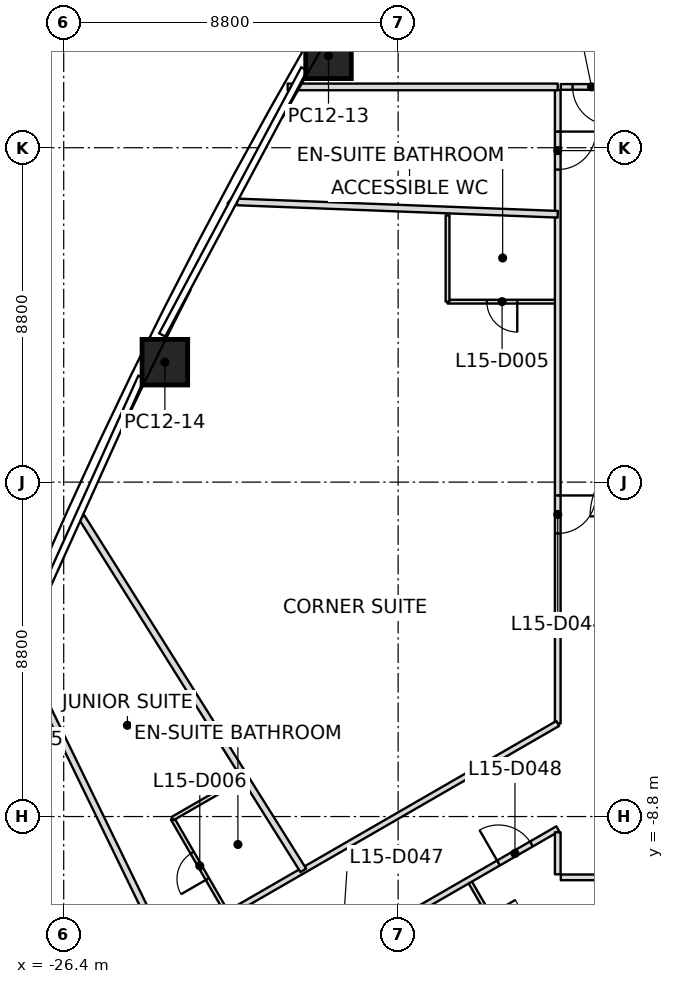
"""IFC4 building model, lengths in metres.
Left out: names, types, materials, properties, quantities, classifications, styles, units other than length and angle.
Written with IfcOpenShell. Run it as: python <this file> out.ifc"""

import sys

from ifc_helpers import new_model, si_unit, direction, frame, frame_2d, origin, origin_2d, place, context, subcontext, project, spatial, rectangle, extrude, element, fill, save


model = new_model("IFC4")
c1 = context("Model", 3, precision=1e-05, world=origin(), true_north=direction((0.0, 1.0)))
c2 = subcontext(c1, "Body", "Model", "MODEL_VIEW")
j1 = project(units=[si_unit("LENGTHUNIT", "METRE"), si_unit("PLANEANGLEUNIT", "RADIAN")], contexts=[c1])
p1 = place(None, origin())
s1 = spatial("IfcSite", under=j1, at=p1, CompositionType="ELEMENT")
p2 = place(p1, origin())
s2 = spatial("IfcBuilding", under=s1, at=p2, CompositionType="ELEMENT")
p3 = place(p2, frame((0.0, 0.0, 77.6)))
s3 = spatial("IfcBuildingStorey", under=s2, at=p3, CompositionType="ELEMENT", Elevation=77.6)
p4 = place(p3, frame((-19.432, 11.219, 0.0), z_axis=(0.010688725148, -0.006202099777, 0.999923639641), x_axis=(0.499971436973, 0.8660418936, 2.7223042e-05)))
e1 = element("IfcColumn", 1, at=p4, inside=s3, PredefinedType="COLUMN", context=c2, shape_type="SweptSolid", body=[
    extrude(rectangle(XDim=1.2, YDim=1.2, at=origin_2d()), origin(), (0.0, 0.0, 1.0), 3.7),
])
p5 = place(p3, frame((-23.738, 3.156, 0.0), z_axis=(0.015240683228, 0.002309194428, 0.99988118754), x_axis=(0.441517205772, 0.897209609592, -0.00880190108)))
e2 = element("IfcColumn", 2, at=p5, inside=s3, PredefinedType="COLUMN", context=c2, shape_type="SweptSolid", body=[
    extrude(rectangle(XDim=1.2, YDim=1.2, at=origin_2d()), origin(), (0.0, 0.0, 1.0), 3.7),
])
p6 = place(p3, frame((-27.5, -5.174, 0.0), z_axis=(0.019460655113, 0.011016709844, 0.999749926235), x_axis=(0.381127273401, 0.924354950562, -0.017604739188)))
e3 = element("IfcColumn", 3, at=p6, inside=s3, PredefinedType="COLUMN", context=c2, shape_type="SweptSolid", body=[
    extrude(rectangle(XDim=1.2, YDim=1.2, at=origin_2d()), origin(), (0.0, 0.0, 1.0), 3.701),
])
p7 = place(p3, frame((-23.732, -12.316, 0.0), z_axis=(0.0, 0.0, 1.0), x_axis=(-0.437347411192, 0.899292634198, 0.0)))
e4 = element("IfcWall", 4, at=p7, inside=s3, PredefinedType="PARTITIONING", context=c2, shape_type="SweptSolid", body=[
    extrude(rectangle(XDim=8.705, YDim=0.175, at=frame_2d((4.352, 0.0))), origin(), (0.0, 0.0, 1.0), 3.15),
])
p8 = place(p3, frame((-20.095, -10.216, 0.0), z_axis=(0.0, 0.0, 1.0), x_axis=(-0.531613758333, 0.846986901877, 0.0)))
e5 = element("IfcWall", 5, at=p8, inside=s3, PredefinedType="PARTITIONING", context=c2, shape_type="SweptSolid", body=[
    extrude(rectangle(XDim=10.974, YDim=0.175, at=frame_2d((5.487, 0.0))), origin(), (0.0, 0.0, 1.0), 2.934),
])
p9 = place(p3, frame((-21.889, 7.287, 0.0), z_axis=(0.0, 0.0, 1.0), x_axis=(-0.779588898124, 0.626291585383, 0.0)))
e6 = element("IfcWall", 6, at=p9, inside=s3, PredefinedType="PARTITIONING", context=c2, shape_type="SweptSolid", body=[
    extrude(rectangle(XDim=0.186, YDim=0.175, at=frame_2d((0.093, 0.0))), origin(), (0.0, 0.0, 1.0), 3.15),
])
p10 = place(p3, frame((-21.839, 7.374, 0.0), z_axis=(0.0, 0.0, 1.0), x_axis=(0.999261729628, -0.038418689463, 0.0)))
e7 = element("IfcWall", 7, at=p10, inside=s3, PredefinedType="PARTITIONING", context=c2, shape_type="SweptSolid", body=[
    extrude(rectangle(XDim=8.446, YDim=0.175, at=frame_2d((4.223, 0.0))), origin(), (0.0, 0.0, 1.0), 2.934),
])
p11 = place(p3, frame((-13.4, 10.4, 0.0), z_axis=(0.0, 0.0, 1.0), x_axis=(-1.0, 0.0, 0.0)))
e8 = element("IfcWall", 8, at=p11, inside=s3, PredefinedType="PARTITIONING", context=c2, shape_type="SweptSolid", body=[
    extrude(rectangle(XDim=7.107, YDim=0.175, at=frame_2d((3.554, 0.0))), origin(), (0.0, 0.0, 1.0), 2.934),
])
p12 = place(p3, frame((-13.4, 10.32, 0.0), z_axis=(0.0, 0.0, 1.0), x_axis=(0.0, -1.0, 0.0)))
e9 = element("IfcWall", 9, at=p12, inside=s3, PredefinedType="PARTITIONING", context=c2, shape_type="SweptSolid", body=[
    extrude(rectangle(XDim=16.671, YDim=0.15, at=frame_2d((8.335, 0.0))), origin(), (0.0, 0.0, 1.0), 2.947),
])
p13 = place(p12, frame((1.095, 0.0, 0.0)))
e10 = element("IfcOpeningElement", 10, at=p13, cuts=e9, PredefinedType="OPENING", context=c2, shape_type="SweptSolid", body=[
    extrude(rectangle(XDim=1.0, YDim=2.1, at=frame_2d((0.5, 1.05))), frame((0.0, 0.075, 0.0), z_axis=(0.0, -1.0, 0.0), x_axis=(1.0, 0.0, 0.0)), (0.0, 0.0, 1.0), 0.15),
])
p14 = place(p12, frame((10.671, 0.0, 0.0)))
e11 = element("IfcOpeningElement", 11, at=p14, cuts=e9, PredefinedType="OPENING", context=c2, shape_type="SweptSolid", body=[
    extrude(rectangle(XDim=1.0, YDim=2.1, at=frame_2d((0.5, 1.05))), frame((0.0, 0.075, 0.0), z_axis=(0.0, -1.0, 0.0), x_axis=(1.0, 0.0, 0.0)), (0.0, 0.0, 1.0), 0.15),
])
p15 = place(p3, frame((-13.4, -6.351, 0.0), z_axis=(0.0, 0.0, 1.0), x_axis=(-0.866031207587, -0.499989947384, 0.0)))
e12 = element("IfcWall", 12, at=p15, inside=s3, PredefinedType="PARTITIONING", context=c2, shape_type="SweptSolid", body=[
    extrude(rectangle(XDim=11.851, YDim=0.15, at=frame_2d((5.925, 0.0))), origin(), (0.0, 0.0, 1.0), 2.947),
])
p16 = place(p15, frame((10.531, 0.0, 0.0)))
e13 = element("IfcOpeningElement", 13, at=p16, cuts=e12, PredefinedType="OPENING", context=c2, shape_type="SweptSolid", body=[
    extrude(rectangle(XDim=1.0, YDim=2.1, at=frame_2d((0.5, 1.05))), frame((0.0, 0.075, 0.0), z_axis=(0.0, -1.0, 0.0), x_axis=(1.0, 0.0, 0.0)), (0.0, 0.0, 1.0), 0.15),
])
p17 = place(p3, frame((-22.463, -14.355, 0.0), z_axis=(0.0, 0.0, 1.0), x_axis=(0.86602514158, 0.500000454152, 0.0)))
e14 = element("IfcWall", 14, at=p17, inside=s3, PredefinedType="PARTITIONING", context=c2, shape_type="SweptSolid", body=[
    extrude(rectangle(XDim=10.465, YDim=0.15, at=frame_2d((5.233, 0.0))), origin(), (0.0, 0.0, 1.0), 2.797),
])
p18 = place(p17, frame((3.393, 0.0, 0.0)))
e15 = element("IfcOpeningElement", 15, at=p18, cuts=e14, PredefinedType="OPENING", context=c2, shape_type="SweptSolid", body=[
    extrude(rectangle(XDim=1.0, YDim=2.1, at=frame_2d((0.5, 1.05))), frame((0.0, 0.075, 0.0), z_axis=(0.0, -1.0, 0.0), x_axis=(1.0, 0.0, 0.0)), (0.0, 0.0, 1.0), 0.15),
])
p19 = place(p17, frame((8.665, 0.0, 0.0)))
e16 = element("IfcOpeningElement", 16, at=p19, cuts=e14, PredefinedType="OPENING", context=c2, shape_type="SweptSolid", body=[
    extrude(rectangle(XDim=1.0, YDim=2.1, at=frame_2d((0.5, 1.05))), frame((0.0, 0.075, 0.0), z_axis=(0.0, -1.0, 0.0), x_axis=(1.0, 0.0, 0.0)), (0.0, 0.0, 1.0), 0.15),
])
p20 = place(p3, frame((-13.4, -9.214, 0.0), z_axis=(0.0, 0.0, 1.0), x_axis=(0.0, -1.0, 0.0)))
e17 = element("IfcWall", 17, at=p20, inside=s3, PredefinedType="PARTITIONING", context=c2, shape_type="SweptSolid", body=[
    extrude(rectangle(XDim=1.106, YDim=0.15, at=frame_2d((0.553, 0.0))), origin(), (0.0, 0.0, 1.0), 2.797),
])
p21 = place(p3, frame((-13.32, -10.4, 0.0), z_axis=(0.0, 0.0, 1.0), x_axis=(1.0, 0.0, 0.0)))
e18 = element("IfcWall", 18, at=p21, inside=s3, PredefinedType="PARTITIONING", context=c2, shape_type="SweptSolid", body=[
    extrude(rectangle(XDim=26.64, YDim=0.15, at=frame_2d((13.32, 0.0))), origin(), (0.0, 0.0, 1.0), 2.947),
])
p22 = place(p21, frame((7.72, 0.0, 0.0)))
e19 = element("IfcOpeningElement", 19, at=p22, cuts=e18, PredefinedType="OPENING", context=c2, shape_type="SweptSolid", body=[
    extrude(rectangle(XDim=1.0, YDim=2.1, at=frame_2d((0.5, 1.05))), frame((0.0, 0.075, 0.0), z_axis=(0.0, -1.0, 0.0), x_axis=(1.0, 0.0, 0.0)), (0.0, 0.0, 1.0), 0.15),
])
p23 = place(p21, frame((11.92, 0.0, 0.0)))
e20 = element("IfcOpeningElement", 20, at=p23, cuts=e18, PredefinedType="OPENING", context=c2, shape_type="SweptSolid", body=[
    extrude(rectangle(XDim=1.0, YDim=2.1, at=frame_2d((0.5, 1.05))), frame((0.0, 0.075, 0.0), z_axis=(0.0, -1.0, 0.0), x_axis=(1.0, 0.0, 0.0)), (0.0, 0.0, 1.0), 0.15),
])
p24 = place(p21, frame((16.52, 0.0, 0.0)))
e21 = element("IfcOpeningElement", 21, at=p24, cuts=e18, PredefinedType="OPENING", context=c2, shape_type="SweptSolid", body=[
    extrude(rectangle(XDim=1.0, YDim=2.1, at=frame_2d((0.5, 1.05))), frame((0.0, 0.075, 0.0), z_axis=(0.0, -1.0, 0.0), x_axis=(1.0, 0.0, 0.0)), (0.0, 0.0, 1.0), 0.15),
])
p25 = place(p21, frame((21.12, 0.0, 0.0)))
e22 = element("IfcOpeningElement", 22, at=p25, cuts=e18, PredefinedType="OPENING", context=c2, shape_type="SweptSolid", body=[
    extrude(rectangle(XDim=1.0, YDim=2.1, at=frame_2d((0.5, 1.05))), frame((0.0, 0.075, 0.0), z_axis=(0.0, -1.0, 0.0), x_axis=(1.0, 0.0, 0.0)), (0.0, 0.0, 1.0), 0.15),
])
p26 = place(p3, frame((-5.08, 10.4, 0.0), z_axis=(0.0, 0.0, 1.0), x_axis=(-1.0, 0.0, 0.0)))
e23 = element("IfcWall", 23, at=p26, inside=s3, PredefinedType="PARTITIONING", context=c2, shape_type="SweptSolid", body=[
    extrude(rectangle(XDim=8.24, YDim=0.15, at=frame_2d((4.12, 0.0))), origin(), (0.0, 0.0, 1.0), 2.947),
])
p27 = place(p26, frame((6.93, 0.0, 0.0)))
e24 = element("IfcOpeningElement", 24, at=p27, cuts=e23, PredefinedType="OPENING", context=c2, shape_type="SweptSolid", body=[
    extrude(rectangle(XDim=1.0, YDim=2.1, at=frame_2d((0.5, 1.05))), frame((0.0, 0.075, 0.0), z_axis=(0.0, -1.0, 0.0), x_axis=(1.0, 0.0, 0.0)), (0.0, 0.0, 1.0), 0.15),
])
p28 = place(p3, frame((-22.102, -11.34, 0.0), z_axis=(0.0, 0.0, 1.0), x_axis=(-0.499999802827, 0.866025517622, 0.0)))
e25 = element("IfcWall", 25, at=p28, inside=s3, PredefinedType="PARTITIONING", context=c2, shape_type="SweptSolid", body=[
    extrude(rectangle(XDim=2.87, YDim=0.1, at=frame_2d((1.435, 0.0))), origin(), (0.0, 0.0, 1.0), 3.15),
])
p29 = place(p28, frame((1.035, 0.0, 0.0)))
e26 = element("IfcOpeningElement", 26, at=p29, cuts=e25, PredefinedType="OPENING", context=c2, shape_type="SweptSolid", body=[
    extrude(rectangle(XDim=0.8, YDim=2.1, at=frame_2d((0.4, 1.05))), frame((0.0, 0.05, 0.0), z_axis=(0.0, -1.0, 0.0), x_axis=(1.0, 0.0, 0.0)), (0.0, 0.0, 1.0), 0.1),
])
p30 = place(p3, frame((-23.537, -8.855, 0.0), z_axis=(0.0, 0.0, 1.0), x_axis=(0.866017224141, 0.500014167291, 0.0)))
e27 = element("IfcWall", 27, at=p30, inside=s3, PredefinedType="PARTITIONING", context=c2, shape_type="SweptSolid", body=[
    extrude(rectangle(XDim=2.27, YDim=0.1, at=frame_2d((1.135, 0.0))), origin(), (0.0, 0.0, 1.0), 3.15),
])
p31 = place(p3, frame((-13.43, 4.749, 0.0), z_axis=(0.0, 0.0, 1.0), x_axis=(-1.0, 0.0, 0.0)))
e28 = element("IfcWall", 28, at=p31, inside=s3, PredefinedType="PARTITIONING", context=c2, shape_type="SweptSolid", body=[
    extrude(rectangle(XDim=2.87, YDim=0.1, at=frame_2d((1.435, 0.0))), origin(), (0.0, 0.0, 1.0), 3.15),
])
p32 = place(p31, frame((1.035, 0.0, 0.0)))
e29 = element("IfcOpeningElement", 29, at=p32, cuts=e28, PredefinedType="OPENING", context=c2, shape_type="SweptSolid", body=[
    extrude(rectangle(XDim=0.8, YDim=2.1, at=frame_2d((0.4, 1.05))), frame((0.0, 0.05, 0.0), z_axis=(0.0, -1.0, 0.0), x_axis=(1.0, 0.0, 0.0)), (0.0, 0.0, 1.0), 0.1),
])
p33 = place(p3, frame((-16.3, 4.749, 0.0), z_axis=(0.0, 0.0, 1.0), x_axis=(0.0, 1.0, 0.0)))
e30 = element("IfcWall", 30, at=p33, inside=s3, PredefinedType="PARTITIONING", context=c2, shape_type="SweptSolid", body=[
    extrude(rectangle(XDim=2.27, YDim=0.1, at=frame_2d((1.135, 0.0))), origin(), (0.0, 0.0, 1.0), 3.15),
])
p34 = place(p3, frame((-15.723, -10.498, 0.0), z_axis=(0.0, 0.0, 1.0), x_axis=(0.499999802827, -0.866025517622, 0.0)))
e31 = element("IfcWall", 31, at=p34, inside=s3, PredefinedType="PARTITIONING", context=c2, shape_type="SweptSolid", body=[
    extrude(rectangle(XDim=2.87, YDim=0.1, at=frame_2d((1.435, 0.0))), origin(), (0.0, 0.0, 1.0), 2.797),
])
p35 = place(p34, frame((1.035, 0.0, 0.0)))
e32 = element("IfcOpeningElement", 32, at=p35, cuts=e31, PredefinedType="OPENING", context=c2, shape_type="SweptSolid", body=[
    extrude(rectangle(XDim=0.8, YDim=2.1, at=frame_2d((0.4, 1.05))), frame((0.0, 0.05, 0.0), z_axis=(0.0, -1.0, 0.0), x_axis=(1.0, 0.0, 0.0)), (0.0, 0.0, 1.0), 0.1),
])
p36 = place(p27, origin())
e33 = element("IfcDoor", 33, at=p36, inside=s3, OperationType="SINGLE_SWING_RIGHT", PredefinedType="DOOR", context=c2, shape_type="SweptSolid", body=[
    extrude(rectangle(XDim=1.0, YDim=2.1, at=frame_2d((0.5, 1.05))), frame((0.0, 0.025, 0.0), z_axis=(0.0, -1.0, 0.0), x_axis=(1.0, 0.0, 0.0)), (0.0, 0.0, 1.0), 0.05),
])
fill(e24, e33)
p37 = place(p13, origin())
e34 = element("IfcDoor", 34, at=p37, inside=s3, OperationType="SINGLE_SWING_LEFT", PredefinedType="DOOR", context=c2, shape_type="SweptSolid", body=[
    extrude(rectangle(XDim=1.0, YDim=2.1, at=frame_2d((0.5, 1.05))), frame((0.0, 0.025, 0.0), z_axis=(0.0, -1.0, 0.0), x_axis=(1.0, 0.0, 0.0)), (0.0, 0.0, 1.0), 0.05),
])
fill(e10, e34)
p38 = place(p14, origin())
e35 = element("IfcDoor", 35, at=p38, inside=s3, OperationType="SINGLE_SWING_RIGHT", PredefinedType="DOOR", context=c2, shape_type="SweptSolid", body=[
    extrude(rectangle(XDim=1.0, YDim=2.1, at=frame_2d((0.5, 1.05))), frame((0.0, 0.025, 0.0), z_axis=(0.0, -1.0, 0.0), x_axis=(1.0, 0.0, 0.0)), (0.0, 0.0, 1.0), 0.05),
])
fill(e11, e35)
p39 = place(p32, origin())
e36 = element("IfcDoor", 36, at=p39, inside=s3, OperationType="SINGLE_SWING_RIGHT", PredefinedType="DOOR", context=c2, shape_type="SweptSolid", body=[
    extrude(rectangle(XDim=0.8, YDim=2.1, at=frame_2d((0.4, 1.05))), frame((0.0, 0.025, 0.0), z_axis=(0.0, -1.0, 0.0), x_axis=(1.0, 0.0, 0.0)), (0.0, 0.0, 1.0), 0.05),
])
fill(e29, e36)
p40 = place(p29, origin())
e37 = element("IfcDoor", 37, at=p40, inside=s3, OperationType="SINGLE_SWING_LEFT", PredefinedType="DOOR", context=c2, shape_type="SweptSolid", body=[
    extrude(rectangle(XDim=0.8, YDim=2.1, at=frame_2d((0.4, 1.05))), frame((0.0, 0.025, 0.0), z_axis=(0.0, -1.0, 0.0), x_axis=(1.0, 0.0, 0.0)), (0.0, 0.0, 1.0), 0.05),
])
fill(e26, e37)
p41 = place(p19, origin())
e38 = element("IfcDoor", 38, at=p41, inside=s3, OperationType="SINGLE_SWING_LEFT", PredefinedType="DOOR", context=c2, shape_type="SweptSolid", body=[
    extrude(rectangle(XDim=1.0, YDim=2.1, at=frame_2d((0.5, 1.05))), frame((0.0, 0.025, 0.0), z_axis=(0.0, -1.0, 0.0), x_axis=(1.0, 0.0, 0.0)), (0.0, 0.0, 1.0), 0.05),
])
fill(e16, e38)
save(model, sys.argv[1])
